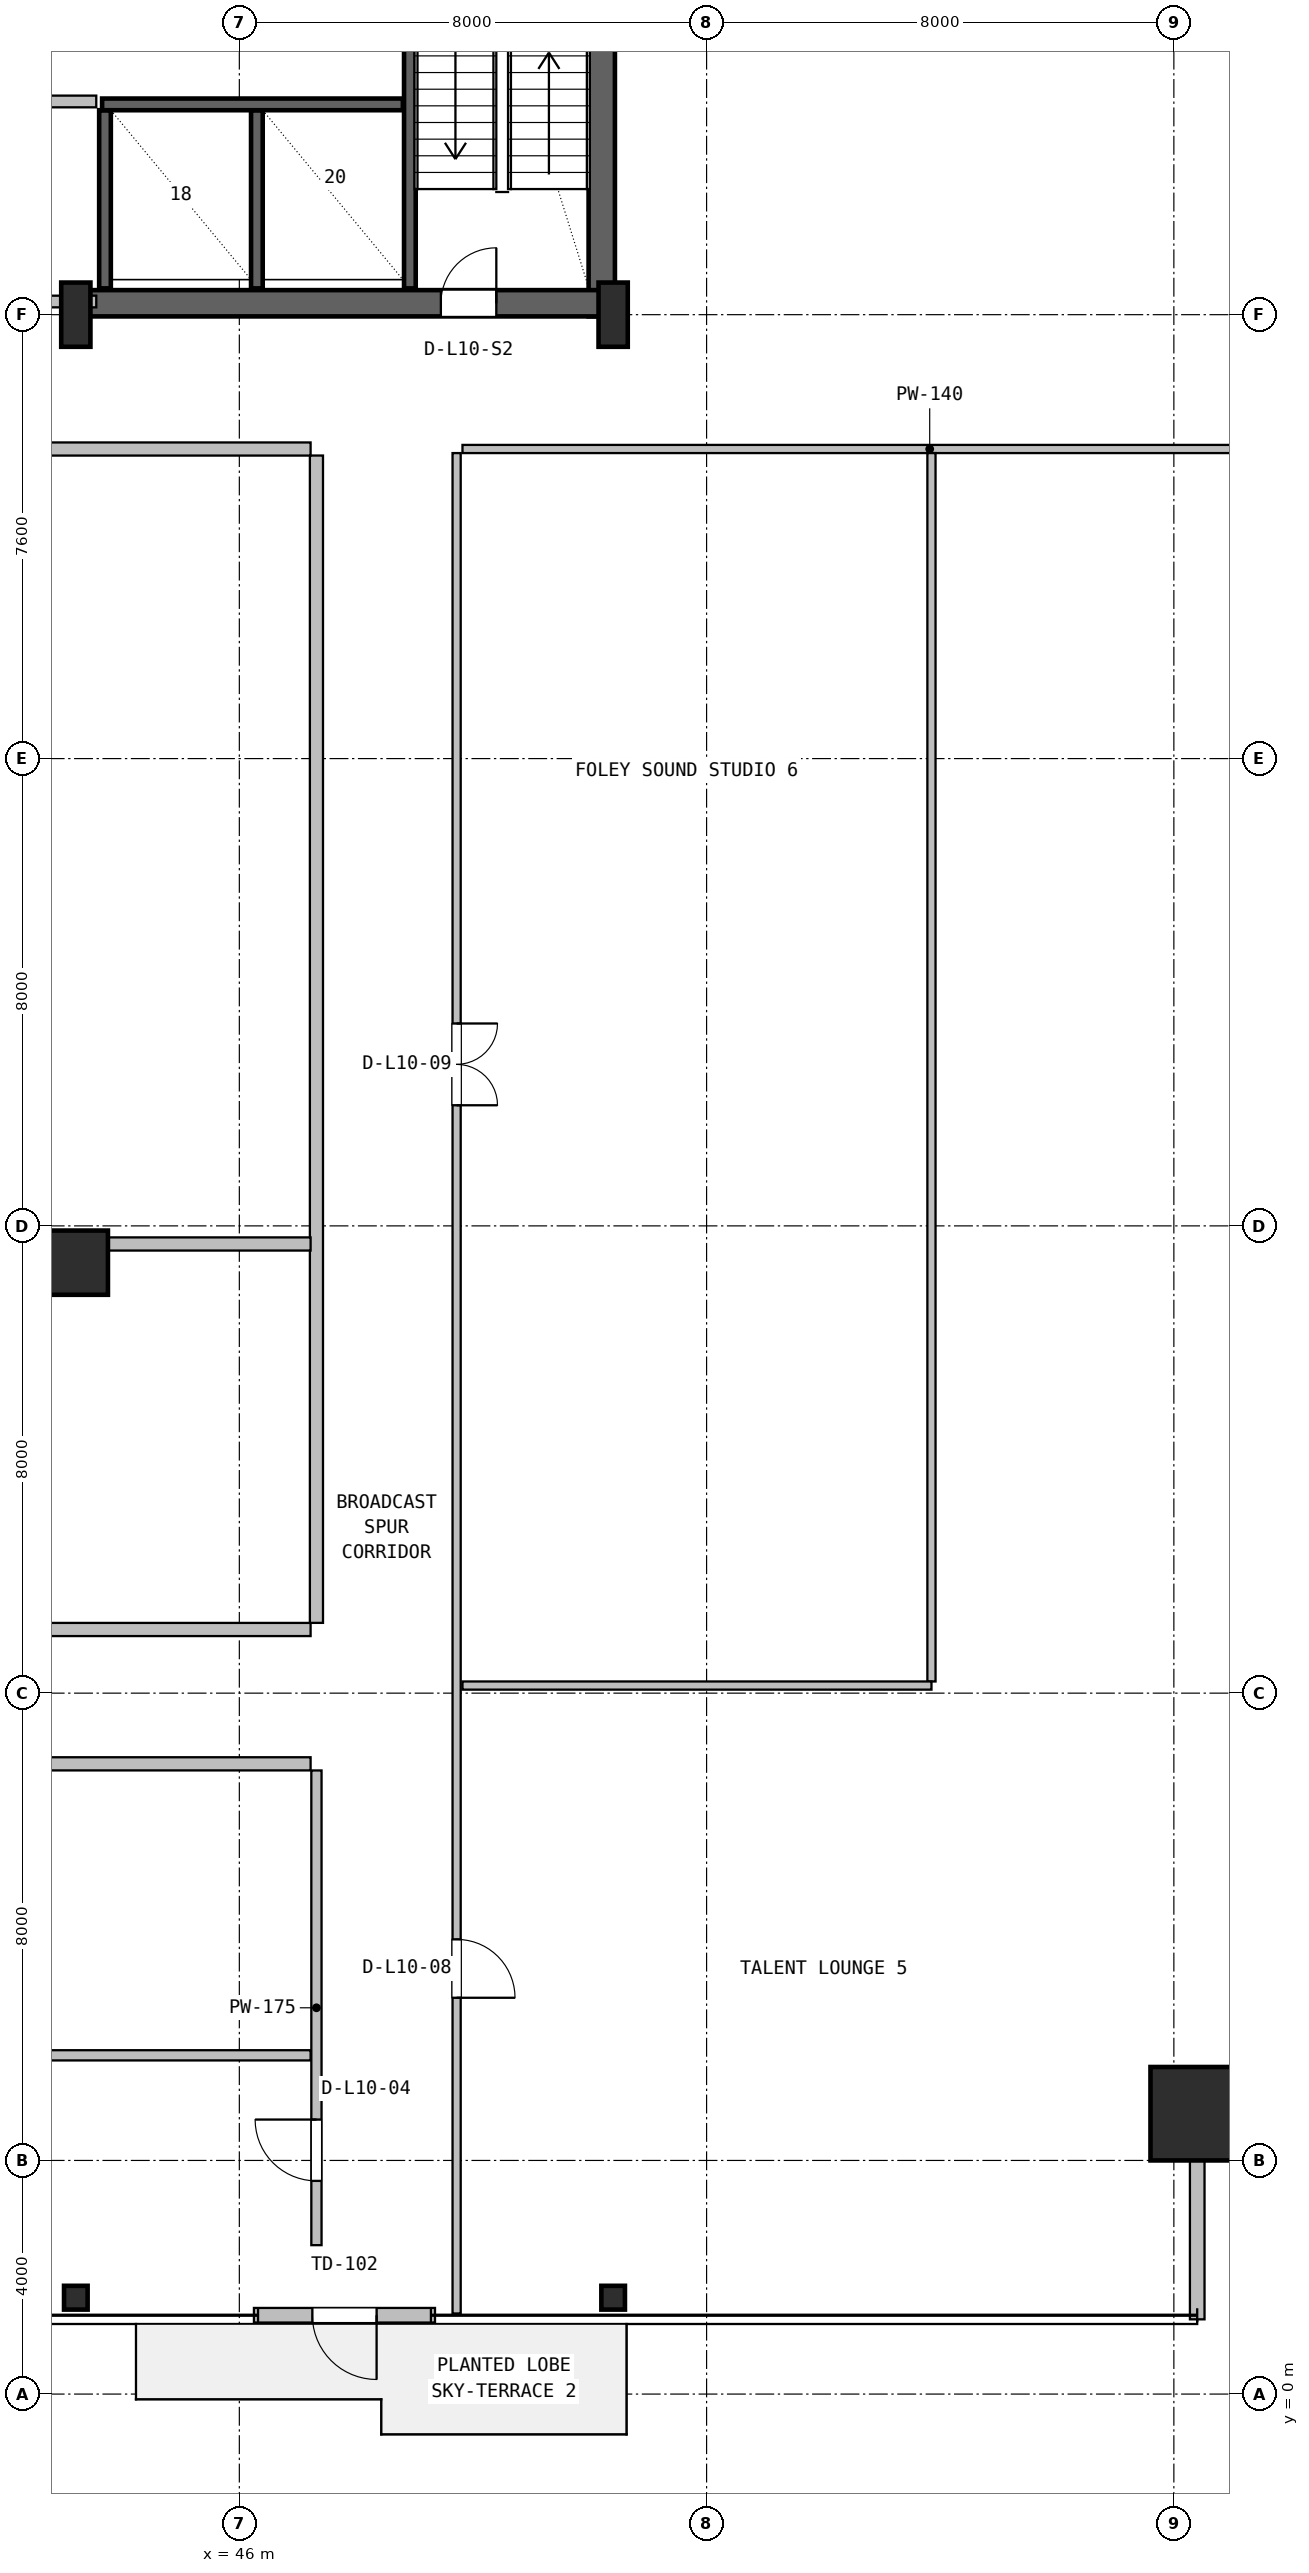
"""IFC4 building model, lengths in metres.
Left out: names, types, materials, properties, quantities, classifications, styles, units other than length and angle.
Written with IfcOpenShell. Run it as: python <this file> out.ifc"""

import sys

from ifc_helpers import new_model, si_unit, direction, frame, frame_2d, origin, origin_2d, place, context, subcontext, project, spatial, rectangle, hollow_rectangle, i_section, extrude, source, transform, mapped, element, fill, save


model = new_model("IFC4")
c1 = context("Model", 3, precision=1e-05, world=origin(), true_north=direction((0.0, 1.0)))
c2 = subcontext(c1, "Body", "Model", "MODEL_VIEW")
j1 = project(units=[si_unit("LENGTHUNIT", "METRE"), si_unit("PLANEANGLEUNIT", "RADIAN")], contexts=[c1])
p1 = place(None, origin())
s1 = spatial("IfcSite", under=j1, at=p1, CompositionType="ELEMENT")
p2 = place(p1, origin())
s2 = spatial("IfcBuilding", under=s1, at=p2, CompositionType="ELEMENT")
p3 = place(p2, frame((0.0, 0.0, 47.1)))
s3 = spatial("IfcBuildingStorey", under=s2, at=p3, CompositionType="ELEMENT", Elevation=47.1)
p4 = place(p3, frame((52.205, 35.57, 0.0), z_axis=(0.0, 0.0, 1.0), x_axis=(0.0, 1.0, 0.0)))
e1 = element("IfcWall", 1, at=p4, inside=s3, PredefinedType="SHEAR", context=c2, shape_type="SweptSolid", body=[
    extrude(rectangle(XDim=11.23, YDim=0.45, at=frame_2d((5.615, 0.0))), origin(), (0.0, 0.0, 1.0), 3.65),
])
p5 = place(p3, frame((43.2, 35.795, 0.0), z_axis=(0.0, 0.0, 1.0), x_axis=(1.0, 0.0, 0.0)))
e2 = element("IfcWall", 2, at=p5, inside=s3, PredefinedType="SHEAR", context=c2, shape_type="SweptSolid", body=[
    extrude(rectangle(XDim=9.23, YDim=0.45, at=frame_2d((4.615, 0.0))), origin(), (0.0, 0.0, 1.0), 3.65),
])
p6 = place(p5, frame((6.25, 0.0, 0.0)))
e3 = element("IfcOpeningElement", 3, at=p6, cuts=e2, PredefinedType="OPENING", context=c2, shape_type="SweptSolid", body=[
    extrude(rectangle(XDim=0.95, YDim=2.1, at=frame_2d((0.475, 1.05))), frame((0.0, 0.235, 0.0), z_axis=(0.0, -1.0, 0.0), x_axis=(1.0, 0.0, 0.0)), (0.0, 0.0, 1.0), 0.47),
])
m1 = source(origin(), c2, "Body", "SweptSolid", [
    extrude(i_section(OverallWidth=0.5, OverallDepth=1.1, WebThickness=0.018, FlangeThickness=0.032, FilletRadius=0.018, at=origin_2d()), origin(), (0.0, 0.0, 1.0), 3.9),
])
for number, where, z_axis, x_axis in (
    (4, (43.2, 35.6, 0.0), (0.0, 0.0, 1.0), (1.0, 0.0, 0.0)),
    (5, (52.4, 35.6, 0.0), (0.0, 0.0, 1.0), (1.0, 0.0, 0.0)),
):
    element("IfcColumn", number, at=place(p3, frame(where, z_axis=z_axis, x_axis=x_axis)), inside=s3, PredefinedType="COLUMN", context=c2, shape_type="MappedRepresentation", body=[
        mapped(m1, transform((0.0, 0.0, 0.0), x_axis=(1.0, 0.0, 0.0), y_axis=(0.0, 1.0, 0.0), z_axis=(0.0, 0.0, 1.0), scale=1.0)),
    ])
m2 = source(origin(), c2, "Body", "SweptSolid", [
    extrude(hollow_rectangle(XDim=1.6, YDim=1.6, WallThickness=0.06, at=origin_2d()), origin(), (0.0, 0.0, 1.0), 3.9),
])
p7 = place(p3, frame((62.4, 4.8, 0.0), z_axis=(0.0, 0.0, 1.0), x_axis=(1.0, 0.0, 0.0)))
e6 = element("IfcColumn", 6, at=p7, inside=s3, PredefinedType="COLUMN", context=c2, shape_type="MappedRepresentation", body=[
    mapped(m2, transform((0.0, 0.0, 0.0), x_axis=(1.0, 0.0, 0.0), y_axis=(0.0, 1.0, 0.0), z_axis=(0.0, 0.0, 1.0), scale=1.0)),
])
m3 = source(origin(), c2, "Body", "SweptSolid", [
    extrude(i_section(OverallWidth=0.404, OverallDepth=0.407, WebThickness=0.027, FlangeThickness=0.044, FilletRadius=0.018, at=origin_2d()), origin(), (0.0, 0.0, 1.0), 3.9),
])
for number, where, z_axis, x_axis in (
    (7, (43.2, 1.65, 0.0), (0.0, 0.0, 1.0), (1.0, 0.0, 0.0)),
    (8, (52.4, 1.65, 0.0), (0.0, 0.0, 1.0), (1.0, 0.0, 0.0)),
):
    element("IfcColumn", number, at=place(p3, frame(where, z_axis=z_axis, x_axis=x_axis)), inside=s3, PredefinedType="COLUMN", context=c2, shape_type="MappedRepresentation", body=[
        mapped(m3, transform((0.0, 0.0, 0.0), x_axis=(1.0, 0.0, 0.0), y_axis=(0.0, 1.0, 0.0), z_axis=(0.0, 0.0, 1.0), scale=1.0)),
    ])
m4 = source(origin(), c2, "Body", "SweptSolid", [
    extrude(rectangle(XDim=1.1, YDim=1.1, at=origin_2d()), origin(), (0.0, 0.0, 1.0), 3.9),
])
p8 = place(p3, frame((43.2, 19.37, 0.0), z_axis=(0.0, 0.0, 1.0), x_axis=(1.0, 0.0, 0.0)))
e9 = element("IfcColumn", 9, at=p8, inside=s3, PredefinedType="COLUMN", context=c2, shape_type="MappedRepresentation", body=[
    mapped(m4, transform((0.0, 0.0, 0.0), x_axis=(1.0, 0.0, 0.0), y_axis=(0.0, 1.0, 0.0), z_axis=(0.0, 0.0, 1.0), scale=1.0)),
])
p9 = place(p3, frame((46.25, 1.35, 0.0), z_axis=(0.0, 0.0, 1.0), x_axis=(1.0, 0.0, 0.0)))
e10 = element("IfcWall", 10, at=p9, inside=s3, PredefinedType="SOLIDWALL", context=c2, shape_type="SweptSolid", body=[
    extrude(rectangle(XDim=3.1, YDim=0.25, at=frame_2d((1.55, 0.0))), origin(), (0.0, 0.0, 1.0), 3.63),
])
p10 = place(p9, frame((1.0, 0.0, 0.0)))
e11 = element("IfcOpeningElement", 11, at=p10, cuts=e10, PredefinedType="OPENING", context=c2, shape_type="SweptSolid", body=[
    extrude(rectangle(XDim=1.1, YDim=2.15, at=frame_2d((0.55, 1.075))), frame((0.0, 0.135, 0.0), z_axis=(0.0, -1.0, 0.0), x_axis=(1.0, 0.0, 0.0)), (0.0, 0.0, 1.0), 0.27),
])
p11 = place(p3, frame((62.4, 1.28, 0.0), z_axis=(0.0, 0.0, 1.0), x_axis=(0.0, 1.0, 0.0)))
e12 = element("IfcWall", 12, at=p11, inside=s3, PredefinedType="SOLIDWALL", context=c2, shape_type="SweptSolid", body=[
    extrude(rectangle(XDim=3.6, YDim=0.25, at=frame_2d((1.8, 0.0))), origin(), (0.0, 0.0, 1.0), 3.208),
])
p12 = place(p3, frame((48.92, 36.05, 0.0), z_axis=(0.0, 0.0, 1.0), x_axis=(0.0, 1.0, 0.0)))
e13 = element("IfcWall", 13, at=p12, inside=s3, PredefinedType="SHEAR", context=c2, shape_type="SweptSolid", body=[
    extrude(rectangle(XDim=10.5, YDim=0.2, at=frame_2d((5.25, 0.0))), origin(), (0.0, 0.0, 1.0), 3.65),
])
for number, where, z_axis, x_axis in (
    (14, (43.7, 36.05, 0.0), (0.0, 0.0, 1.0), (0.0, 1.0, 0.0)),
    (15, (46.3, 36.05, 0.0), (0.0, 0.0, 1.0), (0.0, 1.0, 0.0)),
):
    element("IfcWall", number, at=place(p3, frame(where, z_axis=z_axis, x_axis=x_axis)), inside=s3, PredefinedType="SHEAR", context=c2, shape_type="SweptSolid", body=[
        extrude(rectangle(XDim=3.05, YDim=0.2, at=frame_2d((1.525, 0.0))), origin(), (0.0, 0.0, 1.0), 3.65),
    ])
p13 = place(p3, frame((43.65, 39.2, 0.0), z_axis=(0.0, 0.0, 1.0), x_axis=(1.0, 0.0, 0.0)))
e16 = element("IfcWall", 16, at=p13, inside=s3, PredefinedType="SHEAR", context=c2, shape_type="SweptSolid", body=[
    extrude(rectangle(XDim=5.15, YDim=0.2, at=frame_2d((2.575, 0.0))), origin(), (0.0, 0.0, 1.0), 3.65),
])
p14 = place(p3, frame((39.85, 35.825, 0.0), z_axis=(0.0, 0.0, 1.0), x_axis=(1.0, 0.0, 0.0)))
e17 = element("IfcWall", 17, at=p14, inside=s3, PredefinedType="SOLIDWALL", context=c2, shape_type="SweptSolid", body=[
    extrude(rectangle(XDim=3.7, YDim=0.2, at=frame_2d((1.85, 0.0))), origin(), (0.0, 0.0, 1.0), 2.425),
])
p15 = place(p3, frame((39.85, 39.25, 0.0), z_axis=(0.0, 0.0, 1.0), x_axis=(1.0, 0.0, 0.0)))
e18 = element("IfcWall", 18, at=p15, inside=s3, PredefinedType="SOLIDWALL", context=c2, shape_type="SweptSolid", body=[
    extrude(rectangle(XDim=3.7, YDim=0.2, at=frame_2d((1.85, 0.0))), origin(), (0.0, 0.0, 1.0), 3.63),
])
p16 = place(p15, frame((1.25, 0.0, 0.0)))
e19 = element("IfcOpeningElement", 19, at=p16, cuts=e18, PredefinedType="OPENING", context=c2, shape_type="SweptSolid", body=[
    extrude(rectangle(XDim=1.2, YDim=2.1, at=frame_2d((0.6, 1.05))), frame((0.0, 0.11, 0.0), z_axis=(0.0, -1.0, 0.0), x_axis=(1.0, 0.0, 0.0)), (0.0, 0.0, 1.0), 0.22),
])
p17 = place(p3, frame((47.32, 2.55, 0.0), z_axis=(0.0, 0.0, 1.0), x_axis=(0.0, 1.0, 0.0)))
e20 = element("IfcWall", 20, at=p17, inside=s3, PredefinedType="PARTITIONING", context=c2, shape_type="SweptSolid", body=[
    extrude(rectangle(XDim=8.127, YDim=0.175, at=frame_2d((4.063, 0.0))), origin(), (0.0, 0.0, 1.0), 3.322),
])
p18 = place(p17, frame((1.1, 0.0, 0.0)))
e21 = element("IfcOpeningElement", 21, at=p18, cuts=e20, PredefinedType="OPENING", context=c2, shape_type="SweptSolid", body=[
    extrude(rectangle(XDim=1.05, YDim=2.1, at=frame_2d((0.525, 1.05))), frame((0.0, 0.098, 0.0), z_axis=(0.0, -1.0, 0.0), x_axis=(1.0, 0.0, 0.0)), (0.0, 0.0, 1.0), 0.195),
])
p19 = place(p3, frame((2.18, 5.8, 0.0), z_axis=(0.0, 0.0, 1.0), x_axis=(1.0, 0.0, 0.0)))
e22 = element("IfcWall", 22, at=p19, inside=s3, PredefinedType="PARTITIONING", context=c2, shape_type="SweptSolid", body=[
    extrude(rectangle(XDim=45.04, YDim=0.175, at=frame_2d((22.52, 0.0))), origin(), (0.0, 0.0, 1.0), 2.852),
])
p20 = place(p3, frame((2.18, 10.79, 0.0), z_axis=(0.0, 0.0, 1.0), x_axis=(1.0, 0.0, 0.0)))
e23 = element("IfcWall", 23, at=p20, inside=s3, PredefinedType="PARTITIONING", context=c2, shape_type="SweptSolid", body=[
    extrude(rectangle(XDim=45.04, YDim=0.225, at=frame_2d((22.52, 0.0))), origin(), (0.0, 0.0, 1.0), 2.852),
])
p21 = place(p20, frame((23.755, 0.0, 0.0)))
e24 = element("IfcOpeningElement", 24, at=p21, cuts=e23, PredefinedType="OPENING", context=c2, shape_type="SweptSolid", body=[
    extrude(rectangle(XDim=1.4, YDim=2.12, at=frame_2d((0.7, 1.06))), frame((0.0, 0.123, 0.0), z_axis=(0.0, -1.0, 0.0), x_axis=(1.0, 0.0, 0.0)), (0.0, 0.0, 1.0), 0.245),
])
p22 = place(p3, frame((2.18, 13.09, 0.0), z_axis=(0.0, 0.0, 1.0), x_axis=(1.0, 0.0, 0.0)))
e25 = element("IfcWall", 25, at=p22, inside=s3, PredefinedType="PARTITIONING", context=c2, shape_type="SweptSolid", body=[
    extrude(rectangle(XDim=45.04, YDim=0.225, at=frame_2d((22.52, 0.0))), origin(), (0.0, 0.0, 1.0), 2.852),
])
p23 = place(p22, frame((23.755, 0.0, 0.0)))
e26 = element("IfcOpeningElement", 26, at=p23, cuts=e25, PredefinedType="OPENING", context=c2, shape_type="SweptSolid", body=[
    extrude(rectangle(XDim=1.4, YDim=2.12, at=frame_2d((0.7, 1.06))), frame((0.0, 0.123, 0.0), z_axis=(0.0, -1.0, 0.0), x_axis=(1.0, 0.0, 0.0)), (0.0, 0.0, 1.0), 0.245),
])
p24 = place(p3, frame((47.32, 13.203, 0.0), z_axis=(0.0, 0.0, 1.0), x_axis=(0.0, 1.0, 0.0)))
e27 = element("IfcWall", 27, at=p24, inside=s3, PredefinedType="PARTITIONING", context=c2, shape_type="SweptSolid", body=[
    extrude(rectangle(XDim=19.985, YDim=0.225, at=frame_2d((9.993, 0.0))), origin(), (0.0, 0.0, 1.0), 3.322),
])
p25 = place(p3, frame((2.18, 19.69, 0.0), z_axis=(0.0, 0.0, 1.0), x_axis=(1.0, 0.0, 0.0)))
e28 = element("IfcWall", 28, at=p25, inside=s3, PredefinedType="PARTITIONING", context=c2, shape_type="SweptSolid", body=[
    extrude(rectangle(XDim=45.04, YDim=0.225, at=frame_2d((22.52, 0.0))), origin(), (0.0, 0.0, 1.0), 2.852),
])
p26 = place(p3, frame((2.18, 33.3, 0.0), z_axis=(0.0, 0.0, 1.0), x_axis=(1.0, 0.0, 0.0)))
e29 = element("IfcWall", 29, at=p26, inside=s3, PredefinedType="PARTITIONING", context=c2, shape_type="SweptSolid", body=[
    extrude(rectangle(XDim=45.04, YDim=0.225, at=frame_2d((22.52, 0.0))), origin(), (0.0, 0.0, 1.0), 2.852),
])
p27 = place(p26, frame((23.755, 0.0, 0.0)))
e30 = element("IfcOpeningElement", 30, at=p27, cuts=e29, PredefinedType="OPENING", context=c2, shape_type="SweptSolid", body=[
    extrude(rectangle(XDim=1.4, YDim=2.12, at=frame_2d((0.7, 1.06))), frame((0.0, 0.123, 0.0), z_axis=(0.0, -1.0, 0.0), x_axis=(1.0, 0.0, 0.0)), (0.0, 0.0, 1.0), 0.245),
])
p28 = place(p3, frame((49.82, 33.3, 0.0), z_axis=(0.0, 0.0, 1.0), x_axis=(1.0, 0.0, 0.0)))
e31 = element("IfcWall", 31, at=p28, inside=s3, PredefinedType="PARTITIONING", context=c2, shape_type="SweptSolid", body=[
    extrude(rectangle(XDim=16.0, YDim=0.14, at=frame_2d((8.0, 0.0))), origin(), (0.0, 0.0, 1.0), 3.208),
])
p29 = place(p3, frame((57.85, 12.2, 0.0), z_axis=(0.0, 0.0, 1.0), x_axis=(0.0, 1.0, 0.0)))
e32 = element("IfcWall", 32, at=p29, inside=s3, PredefinedType="PARTITIONING", context=c2, shape_type="SweptSolid", body=[
    extrude(rectangle(XDim=21.03, YDim=0.14, at=frame_2d((10.515, 0.0))), origin(), (0.0, 0.0, 1.0), 3.322),
])
p30 = place(p3, frame((49.82, 12.13, 0.0), z_axis=(0.0, 0.0, 1.0), x_axis=(1.0, 0.0, 0.0)))
e33 = element("IfcWall", 33, at=p30, inside=s3, PredefinedType="PARTITIONING", context=c2, shape_type="SweptSolid", body=[
    extrude(rectangle(XDim=8.03, YDim=0.14, at=frame_2d((4.015, 0.0))), origin(), (0.0, 0.0, 1.0), 3.63),
])
p31 = place(p3, frame((49.72, 1.38, 0.0), z_axis=(0.0, 0.0, 1.0), x_axis=(0.0, 1.0, 0.0)))
e34 = element("IfcWall", 34, at=p31, inside=s3, PredefinedType="PARTITIONING", context=c2, shape_type="SweptSolid", body=[
    extrude(rectangle(XDim=31.85, YDim=0.14, at=frame_2d((15.925, 0.0))), origin(), (0.0, 0.0, 1.0), 3.208),
])
p32 = place(p31, frame((5.405, 0.0, 0.0)))
e35 = element("IfcOpeningElement", 35, at=p32, cuts=e34, PredefinedType="OPENING", context=c2, shape_type="SweptSolid", body=[
    extrude(rectangle(XDim=1.0, YDim=2.1, at=frame_2d((0.5, 1.05))), frame((0.0, 0.08, 0.0), z_axis=(0.0, -1.0, 0.0), x_axis=(1.0, 0.0, 0.0)), (0.0, 0.0, 1.0), 0.16),
])
p33 = place(p31, frame((20.685, 0.0, 0.0)))
e36 = element("IfcOpeningElement", 36, at=p33, cuts=e34, PredefinedType="OPENING", context=c2, shape_type="SweptSolid", body=[
    extrude(rectangle(XDim=1.4, YDim=2.12, at=frame_2d((0.7, 1.06))), frame((0.0, 0.08, 0.0), z_axis=(0.0, -1.0, 0.0), x_axis=(1.0, 0.0, 0.0)), (0.0, 0.0, 1.0), 0.16),
])
m5 = source(origin(), c2, "Body", "SweptSolid", [
    extrude(rectangle(XDim=1.1, YDim=2.15, at=frame_2d((0.55, 1.075))), frame((0.0, 0.025, 0.0), z_axis=(0.0, -1.0, 0.0), x_axis=(1.0, 0.0, 0.0)), (0.0, 0.0, 1.0), 0.05),
])
p34 = place(p10, frame((1.1, 0.0, 0.0), z_axis=(0.0, 0.0, 1.0), x_axis=(-1.0, 0.0, 0.0)))
e37 = element("IfcDoor", 37, at=p34, inside=s3, OperationType="SINGLE_SWING_RIGHT", PredefinedType="DOOR", context=c2, shape_type="MappedRepresentation", body=[
    mapped(m5, transform((0.0, 0.0, 0.0), x_axis=(1.0, 0.0, 0.0), y_axis=(0.0, 1.0, 0.0), z_axis=(0.0, 0.0, 1.0), scale=1.0)),
])
fill(e11, e37)
m6 = source(origin(), c2, "Body", "SweptSolid", [
    extrude(rectangle(XDim=0.95, YDim=2.1, at=frame_2d((0.475, 1.05))), frame((0.0, 0.025, 0.0), z_axis=(0.0, -1.0, 0.0), x_axis=(1.0, 0.0, 0.0)), (0.0, 0.0, 1.0), 0.05),
])
p35 = place(p6, origin())
e38 = element("IfcDoor", 38, at=p35, inside=s3, OperationType="SINGLE_SWING_RIGHT", PredefinedType="DOOR", context=c2, shape_type="MappedRepresentation", body=[
    mapped(m6, transform((0.0, 0.0, 0.0), x_axis=(1.0, 0.0, 0.0), y_axis=(0.0, 1.0, 0.0), z_axis=(0.0, 0.0, 1.0), scale=1.0)),
])
fill(e3, e38)
m7 = source(origin(), c2, "Body", "SweptSolid", [
    extrude(rectangle(XDim=1.05, YDim=2.1, at=frame_2d((0.525, 1.05))), frame((0.0, 0.025, 0.0), z_axis=(0.0, -1.0, 0.0), x_axis=(1.0, 0.0, 0.0)), (0.0, 0.0, 1.0), 0.05),
])
p36 = place(p18, origin())
e39 = element("IfcDoor", 39, at=p36, inside=s3, OperationType="SINGLE_SWING_RIGHT", PredefinedType="DOOR", context=c2, shape_type="MappedRepresentation", body=[
    mapped(m7, transform((0.0, 0.0, 0.0), x_axis=(1.0, 0.0, 0.0), y_axis=(0.0, 1.0, 0.0), z_axis=(0.0, 0.0, 1.0), scale=1.0)),
])
fill(e21, e39)
m8 = source(origin(), c2, "Body", "SweptSolid", [
    extrude(rectangle(XDim=1.0, YDim=2.1, at=frame_2d((0.5, 1.05))), frame((0.0, 0.025, 0.0), z_axis=(0.0, -1.0, 0.0), x_axis=(1.0, 0.0, 0.0)), (0.0, 0.0, 1.0), 0.05),
])
p37 = place(p32, frame((1.0, 0.0, 0.0), z_axis=(0.0, 0.0, 1.0), x_axis=(-1.0, 0.0, 0.0)))
e40 = element("IfcDoor", 40, at=p37, inside=s3, OperationType="SINGLE_SWING_LEFT", PredefinedType="DOOR", context=c2, shape_type="MappedRepresentation", body=[
    mapped(m8, transform((0.0, 0.0, 0.0), x_axis=(1.0, 0.0, 0.0), y_axis=(0.0, 1.0, 0.0), z_axis=(0.0, 0.0, 1.0), scale=1.0)),
])
fill(e35, e40)
m9 = source(origin(), c2, "Body", "SweptSolid", [
    extrude(rectangle(XDim=1.4, YDim=2.12, at=frame_2d((0.7, 1.06))), frame((0.0, 0.025, 0.0), z_axis=(0.0, -1.0, 0.0), x_axis=(1.0, 0.0, 0.0)), (0.0, 0.0, 1.0), 0.05),
])
p38 = place(p33, frame((1.4, 0.0, 0.0), z_axis=(0.0, 0.0, 1.0), x_axis=(-1.0, 0.0, 0.0)))
e41 = element("IfcDoor", 41, at=p38, inside=s3, OperationType="DOUBLE_DOOR_SINGLE_SWING", PredefinedType="DOOR", context=c2, shape_type="MappedRepresentation", body=[
    mapped(m9, transform((0.0, 0.0, 0.0), x_axis=(1.0, 0.0, 0.0), y_axis=(0.0, 1.0, 0.0), z_axis=(0.0, 0.0, 1.0), scale=1.0)),
])
fill(e36, e41)
save(model, sys.argv[1])
